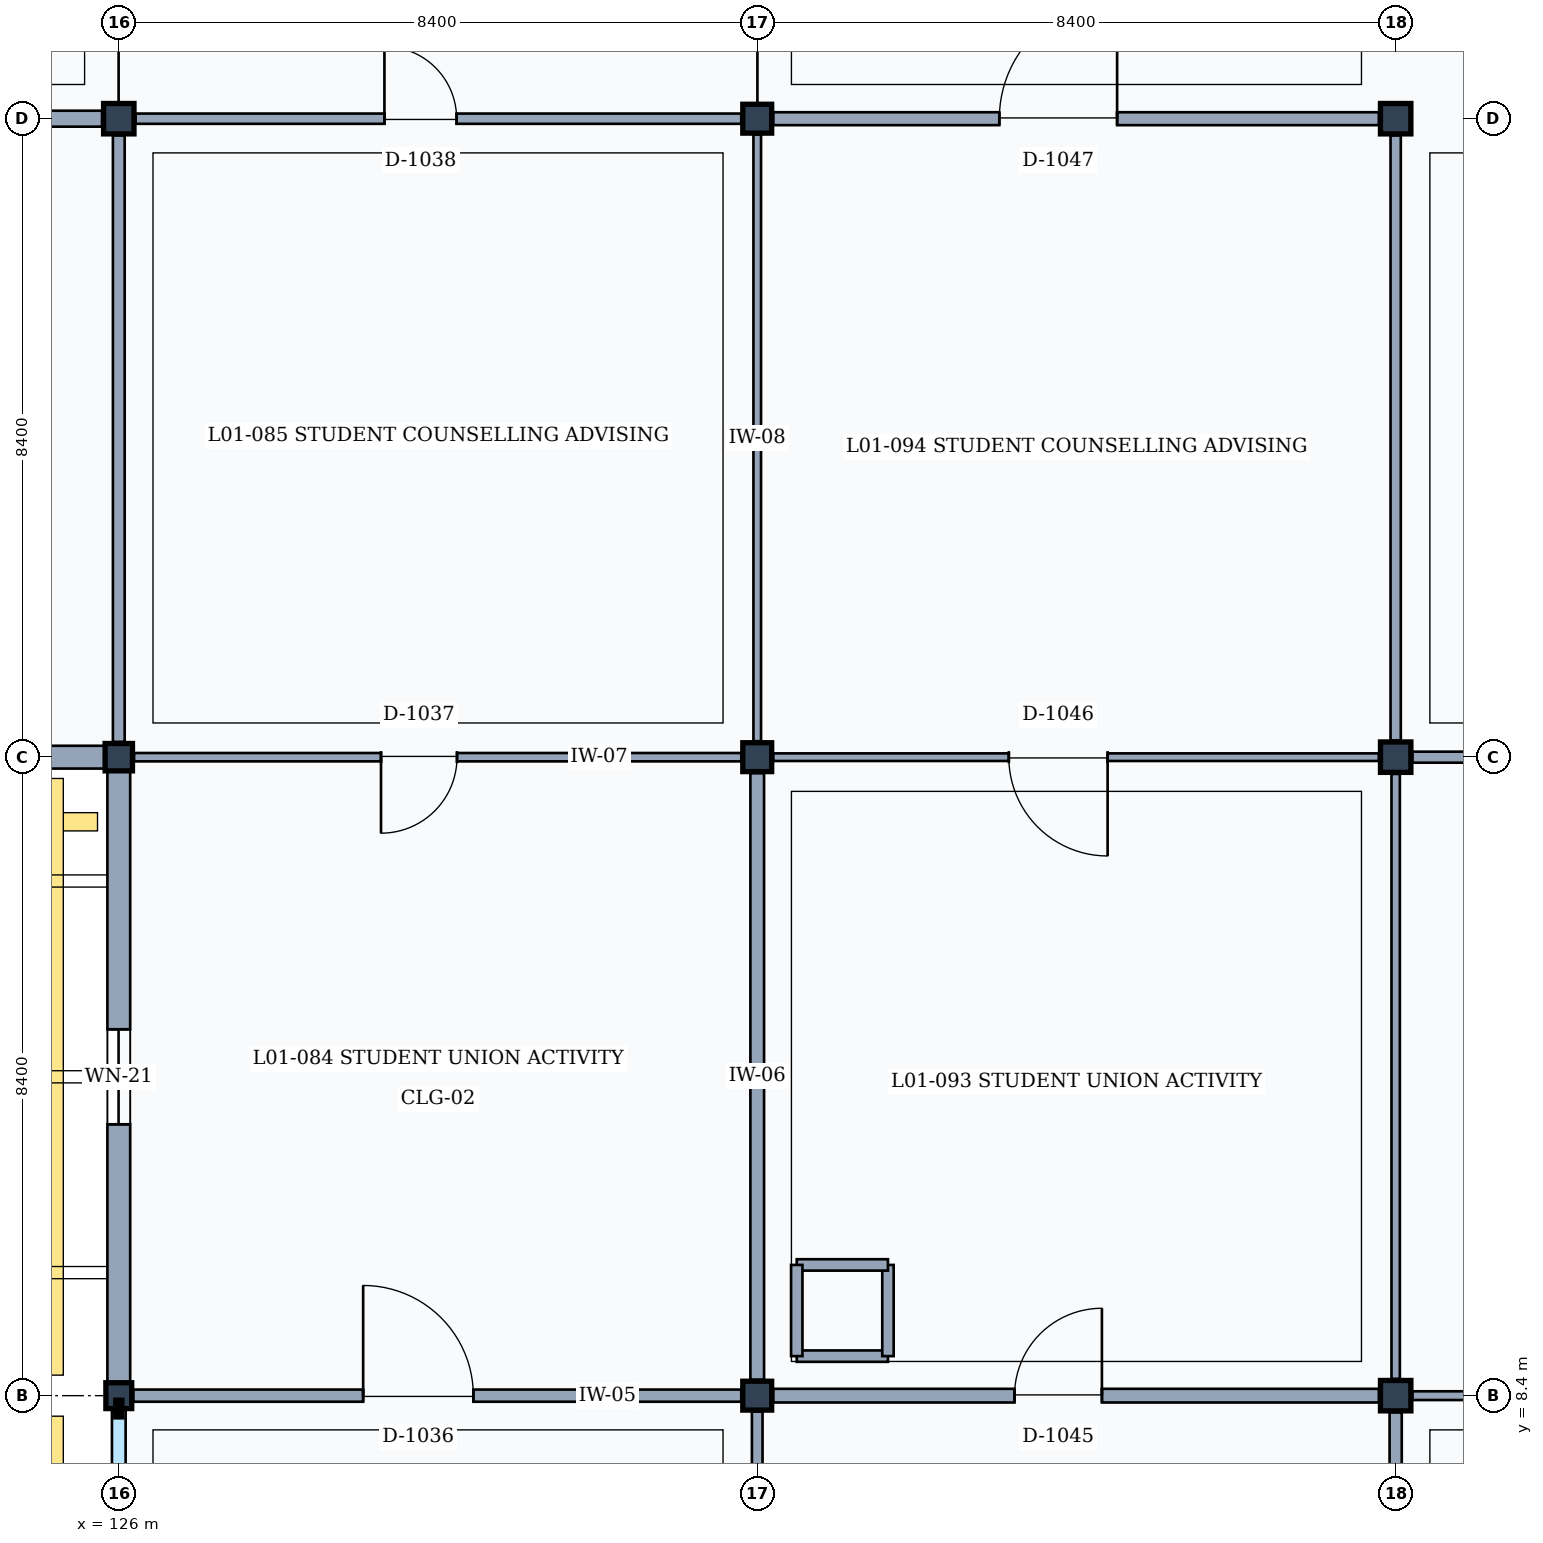
"""IFC4 building model, lengths in metres.
Left out: names, types, materials, properties, quantities, classifications, styles, units other than length and angle.
Written with IfcOpenShell. Run it as: python <this file> out.ifc"""

import sys

from ifc_helpers import new_model, si_unit, direction, frame, frame_2d, origin, origin_2d, place, context, subcontext, project, spatial, rectangle, extrude, element, fill, save


model = new_model("IFC4")
c1 = context("Model", 3, precision=1e-05, world=origin(), true_north=direction((0.0, 1.0)))
c2 = subcontext(c1, "Body", "Model", "MODEL_VIEW")
j1 = project(units=[si_unit("LENGTHUNIT", "METRE"), si_unit("PLANEANGLEUNIT", "RADIAN")], contexts=[c1])
p1 = place(None, origin())
s1 = spatial("IfcSite", under=j1, at=p1, CompositionType="ELEMENT")
p2 = place(p1, origin())
s2 = spatial("IfcBuilding", under=s1, at=p2, CompositionType="ELEMENT")
p3 = place(p2, frame((0.0, 0.0, 4.8)))
s3 = spatial("IfcBuildingStorey", under=s2, at=p3, CompositionType="ELEMENT", Elevation=4.8)
p4 = place(p3, frame((126.0, 8.4, 0.0), z_axis=(0.0, 0.0, 1.0), x_axis=(1.0, 0.0, 0.0)))
e1 = element("IfcColumn", 1, at=p4, inside=s3, PredefinedType="COLUMN", context=c2, shape_type="SweptSolid", body=[
    extrude(rectangle(XDim=0.34, YDim=0.34, at=origin_2d()), origin(), (0.0, 0.0, 1.0), 4.8),
])
p5 = place(p3, frame((126.0, 16.8, 0.0), z_axis=(0.0, 0.0, 1.0), x_axis=(1.0, 0.0, 0.0)))
e2 = element("IfcColumn", 2, at=p5, inside=s3, PredefinedType="COLUMN", context=c2, shape_type="SweptSolid", body=[
    extrude(rectangle(XDim=0.36, YDim=0.36, at=origin_2d()), origin(), (0.0, 0.0, 1.0), 4.8),
])
p6 = place(p3, frame((126.0, 25.2, 0.0), z_axis=(0.0, 0.0, 1.0), x_axis=(1.0, 0.0, 0.0)))
e3 = element("IfcColumn", 3, at=p6, inside=s3, PredefinedType="COLUMN", context=c2, shape_type="SweptSolid", body=[
    extrude(rectangle(XDim=0.4, YDim=0.4, at=origin_2d()), origin(), (0.0, 0.0, 1.0), 4.8),
])
for number, where, z_axis, x_axis in (
    (4, (134.4, 8.4, 0.0), (0.0, 0.0, 1.0), (1.0, 0.0, 0.0)),
    (5, (134.4, 16.8, 0.0), (0.0, 0.0, 1.0), (1.0, 0.0, 0.0)),
    (6, (134.4, 25.2, 0.0), (0.0, 0.0, 1.0), (1.0, 0.0, 0.0)),
):
    element("IfcColumn", number, at=place(p3, frame(where, z_axis=z_axis, x_axis=x_axis)), inside=s3, PredefinedType="COLUMN", context=c2, shape_type="SweptSolid", body=[
        extrude(rectangle(XDim=0.38, YDim=0.38, at=origin_2d()), origin(), (0.0, 0.0, 1.0), 4.8),
    ])
for number, where, z_axis, x_axis in (
    (7, (142.8, 8.4, 0.0), (0.0, 0.0, 1.0), (1.0, 0.0, 0.0)),
    (8, (142.8, 16.8, 0.0), (0.0, 0.0, 1.0), (1.0, 0.0, 0.0)),
    (9, (142.8, 25.2, 0.0), (0.0, 0.0, 1.0), (1.0, 0.0, 0.0)),
):
    element("IfcColumn", number, at=place(p3, frame(where, z_axis=z_axis, x_axis=x_axis)), inside=s3, PredefinedType="COLUMN", context=c2, shape_type="SweptSolid", body=[
        extrude(rectangle(XDim=0.4, YDim=0.4, at=origin_2d()), origin(), (0.0, 0.0, 1.0), 4.8),
    ])
p7 = place(p3, frame((125.82, 16.8, 0.0), z_axis=(0.0, 0.0, 1.0), x_axis=(-1.0, 0.0, 0.0)))
e10 = element("IfcWall", 10, at=p7, inside=s3, PredefinedType="SOLIDWALL", context=c2, shape_type="SweptSolid", body=[
    extrude(rectangle(XDim=8.04, YDim=0.3, at=frame_2d((4.02, 0.0))), origin(), (0.0, 0.0, 1.0), 3.96),
])
p8 = place(p7, frame((2.87, 0.0, 0.9)))
e11 = element("IfcOpeningElement", 11, at=p8, cuts=e10, PredefinedType="OPENING", context=c2, shape_type="SweptSolid", body=[
    extrude(rectangle(XDim=2.3, YDim=1.5, at=frame_2d((1.15, 0.75))), frame((0.0, 0.16, 0.0), z_axis=(0.0, -1.0, 0.0), x_axis=(1.0, 0.0, 0.0)), (0.0, 0.0, 1.0), 0.32),
])
p9 = place(p3, frame((126.0, 8.57, 0.0), z_axis=(0.0, 0.0, 1.0), x_axis=(0.0, 1.0, 0.0)))
e12 = element("IfcWall", 12, at=p9, inside=s3, PredefinedType="SOLIDWALL", context=c2, shape_type="SweptSolid", body=[
    extrude(rectangle(XDim=8.05, YDim=0.3, at=frame_2d((4.025, 0.0))), origin(), (0.0, 0.0, 1.0), 3.96),
])
p10 = place(p9, frame((3.4, 0.0, 0.9)))
e13 = element("IfcOpeningElement", 13, at=p10, cuts=e12, PredefinedType="OPENING", context=c2, shape_type="SweptSolid", body=[
    extrude(rectangle(XDim=1.25, YDim=1.7, at=frame_2d((0.625, 0.85))), frame((0.0, 0.16, 0.0), z_axis=(0.0, -1.0, 0.0), x_axis=(1.0, 0.0, 0.0)), (0.0, 0.0, 1.0), 0.32),
])
for number, where, z_axis, x_axis in (
    (14, (134.92, 8.92, 0.0), (0.0, 0.0, 1.0), (1.0, 0.0, 0.0)),
    (15, (136.12, 8.92, 0.0), (0.0, 0.0, 1.0), (0.0, 1.0, 0.0)),
    (16, (136.12, 10.12, 0.0), (0.0, 0.0, 1.0), (-1.0, 0.0, 0.0)),
    (17, (134.92, 10.12, 0.0), (0.0, 0.0, 1.0), (0.0, -1.0, 0.0)),
):
    element("IfcWall", number, at=place(p3, frame(where, z_axis=z_axis, x_axis=x_axis)), inside=s3, PredefinedType="PARTITIONING", context=c2, shape_type="SweptSolid", body=[
        extrude(rectangle(XDim=1.2, YDim=0.15, at=frame_2d((0.6, 0.0))), origin(), (0.0, 0.0, 1.0), 4.55),
    ])
p11 = place(p3, frame((126.0, 17.0, 0.0), z_axis=(0.0, 0.0, 1.0), x_axis=(0.0, 1.0, 0.0)))
e18 = element("IfcWall", 18, at=p11, inside=s3, PredefinedType="PARTITIONING", context=c2, shape_type="SweptSolid", body=[
    extrude(rectangle(XDim=7.98, YDim=0.155, at=frame_2d((3.99, 0.0))), origin(), (0.0, 0.0, 1.0), 3.92),
])
p12 = place(p3, frame((117.81, 25.2, 0.0), z_axis=(0.0, 0.0, 1.0), x_axis=(1.0, 0.0, 0.0)))
e19 = element("IfcWall", 19, at=p12, inside=s3, PredefinedType="PARTITIONING", context=c2, shape_type="SweptSolid", body=[
    extrude(rectangle(XDim=7.97, YDim=0.21, at=frame_2d((3.985, 0.0))), origin(), (0.0, 0.0, 1.0), 3.89),
])
p13 = place(p12, frame((3.3, 0.0, 0.0)))
e20 = element("IfcOpeningElement", 20, at=p13, cuts=e19, PredefinedType="OPENING", context=c2, shape_type="SweptSolid", body=[
    extrude(rectangle(XDim=0.9, YDim=2.1, at=frame_2d((0.45, 1.05))), frame((0.0, 0.115, 0.0), z_axis=(0.0, -1.0, 0.0), x_axis=(1.0, 0.0, 0.0)), (0.0, 0.0, 1.0), 0.23),
])
p14 = place(p3, frame((134.4, 0.2, 0.0), z_axis=(0.0, 0.0, 1.0), x_axis=(0.0, 1.0, 0.0)))
e21 = element("IfcWall", 21, at=p14, inside=s3, PredefinedType="PARTITIONING", context=c2, shape_type="SweptSolid", body=[
    extrude(rectangle(XDim=7.99, YDim=0.14, at=frame_2d((3.995, 0.0))), origin(), (0.0, 0.0, 1.0), 3.92),
])
p15 = place(p3, frame((126.19, 8.4, 0.0), z_axis=(0.0, 0.0, 1.0), x_axis=(1.0, 0.0, 0.0)))
e22 = element("IfcWall", 22, at=p15, inside=s3, PredefinedType="PARTITIONING", context=c2, shape_type="SweptSolid", body=[
    extrude(rectangle(XDim=8.0, YDim=0.16, at=frame_2d((4.0, 0.0))), origin(), (0.0, 0.0, 1.0), 3.89),
])
p16 = place(p15, frame((3.025, 0.0, 0.0)))
e23 = element("IfcOpeningElement", 23, at=p16, cuts=e22, PredefinedType="OPENING", context=c2, shape_type="SweptSolid", body=[
    extrude(rectangle(XDim=1.45, YDim=2.35, at=frame_2d((0.725, 1.175))), frame((0.0, 0.09, 0.0), z_axis=(0.0, -1.0, 0.0), x_axis=(1.0, 0.0, 0.0)), (0.0, 0.0, 1.0), 0.18),
])
p17 = place(p3, frame((134.4, 8.61, 0.0), z_axis=(0.0, 0.0, 1.0), x_axis=(0.0, 1.0, 0.0)))
e24 = element("IfcWall", 24, at=p17, inside=s3, PredefinedType="PARTITIONING", context=c2, shape_type="SweptSolid", body=[
    extrude(rectangle(XDim=7.98, YDim=0.18, at=frame_2d((3.99, 0.0))), origin(), (0.0, 0.0, 1.0), 3.92),
])
p18 = place(p3, frame((126.2, 16.8, 0.0), z_axis=(0.0, 0.0, 1.0), x_axis=(1.0, 0.0, 0.0)))
e25 = element("IfcWall", 25, at=p18, inside=s3, PredefinedType="PARTITIONING", context=c2, shape_type="SweptSolid", body=[
    extrude(rectangle(XDim=7.99, YDim=0.11, at=frame_2d((3.995, 0.0))), origin(), (0.0, 0.0, 1.0), 3.89),
])
p19 = place(p18, frame((3.25, 0.0, 0.0)))
e26 = element("IfcOpeningElement", 26, at=p19, cuts=e25, PredefinedType="OPENING", context=c2, shape_type="SweptSolid", body=[
    extrude(rectangle(XDim=1.0, YDim=2.15, at=frame_2d((0.5, 1.075))), frame((0.0, 0.065, 0.0), z_axis=(0.0, -1.0, 0.0), x_axis=(1.0, 0.0, 0.0)), (0.0, 0.0, 1.0), 0.13),
])
p20 = place(p3, frame((134.4, 17.01, 0.0), z_axis=(0.0, 0.0, 1.0), x_axis=(0.0, 1.0, 0.0)))
e27 = element("IfcWall", 27, at=p20, inside=s3, PredefinedType="MOVABLE", context=c2, shape_type="SweptSolid", body=[
    extrude(rectangle(XDim=7.98, YDim=0.1, at=frame_2d((3.99, 0.0))), origin(), (0.0, 0.0, 1.0), 3.92),
])
p21 = place(p3, frame((126.22, 25.2, 0.0), z_axis=(0.0, 0.0, 1.0), x_axis=(1.0, 0.0, 0.0)))
e28 = element("IfcWall", 28, at=p21, inside=s3, PredefinedType="PARTITIONING", context=c2, shape_type="SweptSolid", body=[
    extrude(rectangle(XDim=7.97, YDim=0.135, at=frame_2d((3.985, 0.0))), origin(), (0.0, 0.0, 1.0), 3.89),
])
p22 = place(p21, frame((3.275, 0.0, 0.0)))
e29 = element("IfcOpeningElement", 29, at=p22, cuts=e28, PredefinedType="OPENING", context=c2, shape_type="SweptSolid", body=[
    extrude(rectangle(XDim=0.95, YDim=2.15, at=frame_2d((0.475, 1.075))), frame((0.0, 0.077, 0.0), z_axis=(0.0, -1.0, 0.0), x_axis=(1.0, 0.0, 0.0)), (0.0, 0.0, 1.0), 0.155),
])
p23 = place(p3, frame((142.8, 0.2, 0.0), z_axis=(0.0, 0.0, 1.0), x_axis=(0.0, 1.0, 0.0)))
e30 = element("IfcWall", 30, at=p23, inside=s3, PredefinedType="PARTITIONING", context=c2, shape_type="SweptSolid", body=[
    extrude(rectangle(XDim=7.98, YDim=0.16, at=frame_2d((3.99, 0.0))), origin(), (0.0, 0.0, 1.0), 3.92),
])
p24 = place(p3, frame((134.61, 8.4, 0.0), z_axis=(0.0, 0.0, 1.0), x_axis=(1.0, 0.0, 0.0)))
e31 = element("IfcWall", 31, at=p24, inside=s3, PredefinedType="PARTITIONING", context=c2, shape_type="SweptSolid", body=[
    extrude(rectangle(XDim=7.97, YDim=0.18, at=frame_2d((3.985, 0.0))), origin(), (0.0, 0.0, 1.0), 3.89),
])
p25 = place(p24, frame((3.175, 0.0, 0.0)))
e32 = element("IfcOpeningElement", 32, at=p25, cuts=e31, PredefinedType="OPENING", context=c2, shape_type="SweptSolid", body=[
    extrude(rectangle(XDim=1.15, YDim=2.25, at=frame_2d((0.575, 1.125))), frame((0.0, 0.1, 0.0), z_axis=(0.0, -1.0, 0.0), x_axis=(1.0, 0.0, 0.0)), (0.0, 0.0, 1.0), 0.2),
])
p26 = place(p3, frame((142.8, 8.62, 0.0), z_axis=(0.0, 0.0, 1.0), x_axis=(0.0, 1.0, 0.0)))
e33 = element("IfcWall", 33, at=p26, inside=s3, PredefinedType="PARTITIONING", context=c2, shape_type="SweptSolid", body=[
    extrude(rectangle(XDim=7.96, YDim=0.11, at=frame_2d((3.98, 0.0))), origin(), (0.0, 0.0, 1.0), 3.92),
])
p27 = place(p3, frame((134.61, 16.8, 0.0), z_axis=(0.0, 0.0, 1.0), x_axis=(1.0, 0.0, 0.0)))
e34 = element("IfcWall", 34, at=p27, inside=s3, PredefinedType="MOVABLE", context=c2, shape_type="SweptSolid", body=[
    extrude(rectangle(XDim=7.97, YDim=0.1, at=frame_2d((3.985, 0.0))), origin(), (0.0, 0.0, 1.0), 3.89),
])
p28 = place(p27, frame((3.1, 0.0, 0.0)))
e35 = element("IfcOpeningElement", 35, at=p28, cuts=e34, PredefinedType="OPENING", context=c2, shape_type="SweptSolid", body=[
    extrude(rectangle(XDim=1.3, YDim=2.2, at=frame_2d((0.65, 1.1))), frame((0.0, 0.06, 0.0), z_axis=(0.0, -1.0, 0.0), x_axis=(1.0, 0.0, 0.0)), (0.0, 0.0, 1.0), 0.12),
])
p29 = place(p3, frame((142.8, 17.02, 0.0), z_axis=(0.0, 0.0, 1.0), x_axis=(0.0, 1.0, 0.0)))
e36 = element("IfcWall", 36, at=p29, inside=s3, PredefinedType="PARTITIONING", context=c2, shape_type="SweptSolid", body=[
    extrude(rectangle(XDim=7.96, YDim=0.135, at=frame_2d((3.98, 0.0))), origin(), (0.0, 0.0, 1.0), 3.92),
])
p30 = place(p3, frame((134.61, 25.2, 0.0), z_axis=(0.0, 0.0, 1.0), x_axis=(1.0, 0.0, 0.0)))
e37 = element("IfcWall", 37, at=p30, inside=s3, PredefinedType="PARTITIONING", context=c2, shape_type="SweptSolid", body=[
    extrude(rectangle(XDim=7.97, YDim=0.17, at=frame_2d((3.985, 0.0))), origin(), (0.0, 0.0, 1.0), 3.89),
])
p31 = place(p30, frame((2.975, 0.0, 0.0)))
e38 = element("IfcOpeningElement", 38, at=p31, cuts=e37, PredefinedType="OPENING", context=c2, shape_type="SweptSolid", body=[
    extrude(rectangle(XDim=1.55, YDim=2.35, at=frame_2d((0.775, 1.175))), frame((0.0, 0.095, 0.0), z_axis=(0.0, -1.0, 0.0), x_axis=(1.0, 0.0, 0.0)), (0.0, 0.0, 1.0), 0.19),
])
p32 = place(p3, frame((143.02, 8.4, 0.0), z_axis=(0.0, 0.0, 1.0), x_axis=(1.0, 0.0, 0.0)))
e39 = element("IfcWall", 39, at=p32, inside=s3, PredefinedType="PARTITIONING", context=c2, shape_type="SweptSolid", body=[
    extrude(rectangle(XDim=7.97, YDim=0.115, at=frame_2d((3.985, 0.0))), origin(), (0.0, 0.0, 1.0), 3.92),
])
p33 = place(p32, frame((2.85, 0.0, 0.0)))
e40 = element("IfcOpeningElement", 40, at=p33, cuts=e39, PredefinedType="OPENING", context=c2, shape_type="SweptSolid", body=[
    extrude(rectangle(XDim=1.8, YDim=2.3, at=frame_2d((0.9, 1.15))), frame((0.0, 0.067, 0.0), z_axis=(0.0, -1.0, 0.0), x_axis=(1.0, 0.0, 0.0)), (0.0, 0.0, 1.0), 0.135),
])
p34 = place(p3, frame((143.02, 16.8, 0.0), z_axis=(0.0, 0.0, 1.0), x_axis=(1.0, 0.0, 0.0)))
e41 = element("IfcWall", 41, at=p34, inside=s3, PredefinedType="PARTITIONING", context=c2, shape_type="SweptSolid", body=[
    extrude(rectangle(XDim=7.97, YDim=0.145, at=frame_2d((3.985, 0.0))), origin(), (0.0, 0.0, 1.0), 3.92),
])
p35 = place(p34, frame((3.15, 0.0, 0.0)))
e42 = element("IfcOpeningElement", 42, at=p35, cuts=e41, PredefinedType="OPENING", context=c2, shape_type="SweptSolid", body=[
    extrude(rectangle(XDim=1.2, YDim=2.2, at=frame_2d((0.6, 1.1))), frame((0.0, 0.083, 0.0), z_axis=(0.0, -1.0, 0.0), x_axis=(1.0, 0.0, 0.0)), (0.0, 0.0, 1.0), 0.165),
])
p36 = place(p10, origin())
e43 = element("IfcWindow", 43, at=p36, inside=s3, PartitioningType="SINGLE_PANEL", PredefinedType="WINDOW", context=c2, shape_type="SweptSolid", body=[
    extrude(rectangle(XDim=1.25, YDim=1.7, at=frame_2d((0.625, 0.85))), frame((0.0, 0.03, 0.0), z_axis=(0.0, -1.0, 0.0), x_axis=(1.0, 0.0, 0.0)), (0.0, 0.0, 1.0), 0.06),
])
fill(e13, e43)
p37 = place(p16, origin())
e44 = element("IfcDoor", 44, at=p37, inside=s3, OperationType="SINGLE_SWING_LEFT", PredefinedType="DOOR", context=c2, shape_type="SweptSolid", body=[
    extrude(rectangle(XDim=1.45, YDim=2.35, at=frame_2d((0.725, 1.175))), frame((0.0, 0.025, 0.0), z_axis=(0.0, -1.0, 0.0), x_axis=(1.0, 0.0, 0.0)), (0.0, 0.0, 1.0), 0.05),
])
fill(e23, e44)
p38 = place(p19, frame((1.0, 0.0, 0.0), z_axis=(0.0, 0.0, 1.0), x_axis=(-1.0, 0.0, 0.0)))
e45 = element("IfcDoor", 45, at=p38, inside=s3, OperationType="SINGLE_SWING_RIGHT", PredefinedType="DOOR", context=c2, shape_type="SweptSolid", body=[
    extrude(rectangle(XDim=1.0, YDim=2.15, at=frame_2d((0.5, 1.075))), frame((0.0, 0.025, 0.0), z_axis=(0.0, -1.0, 0.0), x_axis=(1.0, 0.0, 0.0)), (0.0, 0.0, 1.0), 0.05),
])
fill(e26, e45)
p39 = place(p22, origin())
e46 = element("IfcDoor", 46, at=p39, inside=s3, OperationType="SINGLE_SWING_LEFT", PredefinedType="DOOR", context=c2, shape_type="SweptSolid", body=[
    extrude(rectangle(XDim=0.95, YDim=2.15, at=frame_2d((0.475, 1.075))), frame((0.0, 0.025, 0.0), z_axis=(0.0, -1.0, 0.0), x_axis=(1.0, 0.0, 0.0)), (0.0, 0.0, 1.0), 0.05),
])
fill(e29, e46)
p40 = place(p25, origin())
e47 = element("IfcDoor", 47, at=p40, inside=s3, OperationType="SINGLE_SWING_RIGHT", PredefinedType="DOOR", context=c2, shape_type="SweptSolid", body=[
    extrude(rectangle(XDim=1.15, YDim=2.25, at=frame_2d((0.575, 1.125))), frame((0.0, 0.025, 0.0), z_axis=(0.0, -1.0, 0.0), x_axis=(1.0, 0.0, 0.0)), (0.0, 0.0, 1.0), 0.05),
])
fill(e32, e47)
p41 = place(p28, frame((1.3, 0.0, 0.0), z_axis=(0.0, 0.0, 1.0), x_axis=(-1.0, 0.0, 0.0)))
e48 = element("IfcDoor", 48, at=p41, inside=s3, OperationType="SINGLE_SWING_LEFT", PredefinedType="DOOR", context=c2, shape_type="SweptSolid", body=[
    extrude(rectangle(XDim=1.3, YDim=2.2, at=frame_2d((0.65, 1.1))), frame((0.0, 0.025, 0.0), z_axis=(0.0, -1.0, 0.0), x_axis=(1.0, 0.0, 0.0)), (0.0, 0.0, 1.0), 0.05),
])
fill(e35, e48)
p42 = place(p31, origin())
e49 = element("IfcDoor", 49, at=p42, inside=s3, OperationType="SINGLE_SWING_RIGHT", PredefinedType="DOOR", context=c2, shape_type="SweptSolid", body=[
    extrude(rectangle(XDim=1.55, YDim=2.35, at=frame_2d((0.775, 1.175))), frame((0.0, 0.025, 0.0), z_axis=(0.0, -1.0, 0.0), x_axis=(1.0, 0.0, 0.0)), (0.0, 0.0, 1.0), 0.05),
])
fill(e38, e49)
save(model, sys.argv[1])
